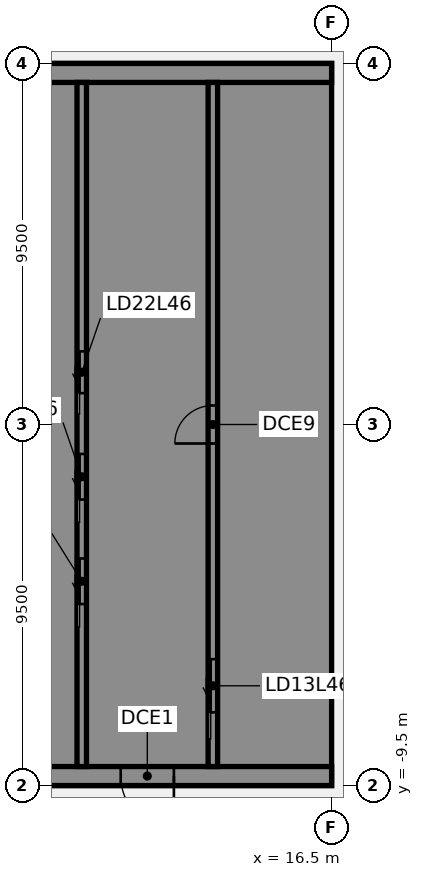
"""IFC4 building model, lengths in metres.
Left out: names, types, materials, properties, quantities, classifications, styles, units other than length and angle.
Written with IfcOpenShell. Run it as: python <this file> out.ifc"""

import sys

from ifc_helpers import new_model, si_unit, direction, frame, frame_2d, origin, place, context, subcontext, project, spatial, polyline, rectangle, outline, extrude, element, fill, save


model = new_model("IFC4")
c1 = context("Model", 3, precision=1e-05, world=origin(), true_north=direction((0.0, 1.0)))
c2 = subcontext(c1, "Body", "Model", "MODEL_VIEW")
j1 = project(units=[si_unit("LENGTHUNIT", "METRE"), si_unit("PLANEANGLEUNIT", "RADIAN")], contexts=[c1])
p1 = place(None, origin())
s1 = spatial("IfcSite", under=j1, at=p1, CompositionType="ELEMENT")
p2 = place(p1, origin())
s2 = spatial("IfcBuilding", under=s1, at=p2, CompositionType="ELEMENT")
p3 = place(p2, frame((0.0, 0.0, 186.1)))
s3 = spatial("IfcBuildingStorey", under=s2, at=p3, CompositionType="ELEMENT", Elevation=186.1)
p4 = place(p3, frame((16.5, -9.25, 0.0), z_axis=(0.0, 0.0, 1.0), x_axis=(-1.0, 0.0, 0.0)))
e1 = element("IfcWall", 1, at=p4, inside=s3, PredefinedType="SHEAR", context=c2, shape_type="SweptSolid", body=[
    extrude(rectangle(XDim=13.0, YDim=0.5, at=frame_2d((6.5, 0.0))), origin(), (0.0, 0.0, 1.0), 3.46),
])
p5 = place(p4, frame((4.15, 0.0, 0.0)))
e2 = element("IfcOpeningElement", 2, at=p5, cuts=e1, PredefinedType="OPENING", context=c2, shape_type="SweptSolid", body=[
    extrude(rectangle(XDim=1.4, YDim=2.1, at=frame_2d((0.7, 1.05))), frame((0.0, 0.26, 0.0), z_axis=(0.0, -1.0, 0.0), x_axis=(1.0, 0.0, 0.0)), (0.0, 0.0, 1.0), 0.52),
])
p6 = place(p4, frame((10.125, 0.0, 0.0)))
e3 = element("IfcOpeningElement", 3, at=p6, cuts=e1, PredefinedType="OPENING", context=c2, shape_type="SweptSolid", body=[
    extrude(rectangle(XDim=1.4, YDim=2.1, at=frame_2d((0.7, 1.05))), frame((0.0, 0.26, 0.0), z_axis=(0.0, -1.0, 0.0), x_axis=(1.0, 0.0, 0.0)), (0.0, 0.0, 1.0), 0.52),
])
p7 = place(p3, origin())
e4 = element("IfcWall", 4, at=p7, inside=s3, PredefinedType="SHEAR", context=c2, shape_type="SweptSolid", body=[
    extrude(outline(polyline([(13.5, -8.125), (13.5, -9.0), (16.0, -9.0), (16.5, -9.0), (16.5, 9.0), (16.0, 9.0), (13.5, 9.0), (13.5, 8.125), (16.0, 8.125), (16.0, 5.625), (13.5, 5.625), (13.5, 5.375), (16.0, 5.375), (16.0, -5.375), (13.5, -5.375), (13.5, -5.625), (16.0, -5.625), (16.0, -8.125), (13.5, -8.125)])), origin(), (0.0, 0.0, 1.0), 3.46),
])
p8 = place(p3, frame((16.5, 9.25, 0.0), z_axis=(0.0, 0.0, 1.0), x_axis=(-1.0, 0.0, 0.0)))
e5 = element("IfcWall", 5, at=p8, inside=s3, PredefinedType="SHEAR", context=c2, shape_type="SweptSolid", body=[
    extrude(rectangle(XDim=13.0, YDim=0.5, at=frame_2d((6.5, 0.0))), origin(), (0.0, 0.0, 1.0), 3.46),
])
p9 = place(p3, origin())
e6 = element("IfcWall", 6, at=p9, inside=s3, PredefinedType="SHEAR", context=c2, shape_type="SweptSolid", body=[
    extrude(outline(polyline([(9.8, -5.375), (7.5, -5.375), (7.5, -2.875), (9.8, -2.875), (9.8, -2.625), (7.5, -2.625), (7.5, -0.125), (9.8, -0.125), (9.8, 0.125), (7.5, 0.125), (7.5, 2.625), (9.8, 2.625), (9.8, 2.875), (7.5, 2.875), (7.5, 5.375), (9.8, 5.375), (9.8, 5.625), (7.5, 5.625), (7.5, 8.125), (9.8, 8.125), (9.8, 9.0), (7.5, 9.0), (7.25, 9.0), (7.25, -5.625), (7.5, -5.625), (9.8, -5.625), (9.8, -5.375)])), origin(), (0.0, 0.0, 1.0), 3.46),
])
p10 = place(p3, origin())
e7 = element("IfcWall", 7, at=p10, inside=s3, PredefinedType="SHEAR", context=c2, shape_type="SweptSolid", body=[
    extrude(outline(polyline([(7.5, -8.125), (7.5, -9.0), (9.8, -9.0), (9.8, -8.125), (9.8, -5.625), (9.55, -5.625), (9.55, -8.125), (7.5, -8.125)])), origin(), (0.0, 0.0, 1.0), 3.46),
])
p11 = place(p3, frame((13.375, -9.0, 0.0), z_axis=(0.0, 0.0, 1.0), x_axis=(0.0, 1.0, 0.0)))
e8 = element("IfcWall", 8, at=p11, inside=s3, PredefinedType="SHEAR", context=c2, shape_type="SweptSolid", body=[
    extrude(rectangle(XDim=18.0, YDim=0.25, at=frame_2d((9.0, 0.0))), origin(), (0.0, 0.0, 1.0), 3.46),
])
p12 = place(p11, frame((1.425, 0.0, 0.0)))
e9 = element("IfcOpeningElement", 9, at=p12, cuts=e8, PredefinedType="OPENING", context=c2, shape_type="SweptSolid", body=[
    extrude(rectangle(XDim=1.4, YDim=2.1, at=frame_2d((0.7, 1.05))), frame((0.0, 0.135, 0.0), z_axis=(0.0, -1.0, 0.0), x_axis=(1.0, 0.0, 0.0)), (0.0, 0.0, 1.0), 0.27),
])
p13 = place(p11, frame((8.5, 0.0, 0.0)))
e10 = element("IfcOpeningElement", 10, at=p13, cuts=e8, PredefinedType="OPENING", context=c2, shape_type="SweptSolid", body=[
    extrude(rectangle(XDim=1.0, YDim=2.1, at=frame_2d((0.5, 1.05))), frame((0.0, 0.135, 0.0), z_axis=(0.0, -1.0, 0.0), x_axis=(1.0, 0.0, 0.0)), (0.0, 0.0, 1.0), 0.27),
])
p14 = place(p3, frame((9.925, -9.0, 0.0), z_axis=(0.0, 0.0, 1.0), x_axis=(0.0, 1.0, 0.0)))
e11 = element("IfcWall", 11, at=p14, inside=s3, PredefinedType="SHEAR", context=c2, shape_type="SweptSolid", body=[
    extrude(rectangle(XDim=18.0, YDim=0.25, at=frame_2d((9.0, 0.0))), origin(), (0.0, 0.0, 1.0), 3.46),
])
p15 = place(p14, frame((4.275, 0.0, 0.0)))
e12 = element("IfcOpeningElement", 12, at=p15, cuts=e11, PredefinedType="OPENING", context=c2, shape_type="SweptSolid", body=[
    extrude(rectangle(XDim=1.2, YDim=2.1, at=frame_2d((0.6, 1.05))), frame((0.0, 0.135, 0.0), z_axis=(0.0, -1.0, 0.0), x_axis=(1.0, 0.0, 0.0)), (0.0, 0.0, 1.0), 0.27),
])
p16 = place(p14, frame((7.025, 0.0, 0.0)))
e13 = element("IfcOpeningElement", 13, at=p16, cuts=e11, PredefinedType="OPENING", context=c2, shape_type="SweptSolid", body=[
    extrude(rectangle(XDim=1.2, YDim=2.1, at=frame_2d((0.6, 1.05))), frame((0.0, 0.135, 0.0), z_axis=(0.0, -1.0, 0.0), x_axis=(1.0, 0.0, 0.0)), (0.0, 0.0, 1.0), 0.27),
])
p17 = place(p14, frame((9.825, 0.0, 0.0)))
e14 = element("IfcOpeningElement", 14, at=p17, cuts=e11, PredefinedType="OPENING", context=c2, shape_type="SweptSolid", body=[
    extrude(rectangle(XDim=1.1, YDim=2.1, at=frame_2d((0.55, 1.05))), frame((0.0, 0.135, 0.0), z_axis=(0.0, -1.0, 0.0), x_axis=(1.0, 0.0, 0.0)), (0.0, 0.0, 1.0), 0.27),
])
p18 = place(p5, origin())
e15 = element("IfcDoor", 15, at=p18, inside=s3, OperationType="SINGLE_SWING_LEFT", PredefinedType="DOOR", context=c2, shape_type="SweptSolid", body=[
    extrude(rectangle(XDim=1.4, YDim=2.1, at=frame_2d((0.7, 1.05))), frame((0.0, 0.025, 0.0), z_axis=(0.0, -1.0, 0.0), x_axis=(1.0, 0.0, 0.0)), (0.0, 0.0, 1.0), 0.05),
])
fill(e2, e15)
p19 = place(p12, origin())
e16 = element("IfcDoor", 16, at=p19, inside=s3, OperationType="SLIDING_TO_LEFT", PredefinedType="DOOR", context=c2, shape_type="SweptSolid", body=[
    extrude(rectangle(XDim=1.4, YDim=2.1, at=frame_2d((0.7, 1.05))), frame((0.0, 0.025, 0.0), z_axis=(0.0, -1.0, 0.0), x_axis=(1.0, 0.0, 0.0)), (0.0, 0.0, 1.0), 0.05),
])
fill(e9, e16)
p20 = place(p15, origin())
e17 = element("IfcDoor", 17, at=p20, inside=s3, OperationType="SLIDING_TO_LEFT", PredefinedType="DOOR", context=c2, shape_type="SweptSolid", body=[
    extrude(rectangle(XDim=1.2, YDim=2.1, at=frame_2d((0.6, 1.05))), frame((0.0, 0.025, 0.0), z_axis=(0.0, -1.0, 0.0), x_axis=(1.0, 0.0, 0.0)), (0.0, 0.0, 1.0), 0.05),
])
fill(e12, e17)
p21 = place(p16, origin())
e18 = element("IfcDoor", 18, at=p21, inside=s3, OperationType="SLIDING_TO_LEFT", PredefinedType="DOOR", context=c2, shape_type="SweptSolid", body=[
    extrude(rectangle(XDim=1.2, YDim=2.1, at=frame_2d((0.6, 1.05))), frame((0.0, 0.025, 0.0), z_axis=(0.0, -1.0, 0.0), x_axis=(1.0, 0.0, 0.0)), (0.0, 0.0, 1.0), 0.05),
])
fill(e13, e18)
p22 = place(p17, origin())
e19 = element("IfcDoor", 19, at=p22, inside=s3, OperationType="SLIDING_TO_LEFT", PredefinedType="DOOR", context=c2, shape_type="SweptSolid", body=[
    extrude(rectangle(XDim=1.1, YDim=2.1, at=frame_2d((0.55, 1.05))), frame((0.0, 0.025, 0.0), z_axis=(0.0, -1.0, 0.0), x_axis=(1.0, 0.0, 0.0)), (0.0, 0.0, 1.0), 0.05),
])
fill(e14, e19)
p23 = place(p13, origin())
e20 = element("IfcDoor", 20, at=p23, inside=s3, OperationType="SINGLE_SWING_LEFT", PredefinedType="DOOR", context=c2, shape_type="SweptSolid", body=[
    extrude(rectangle(XDim=1.0, YDim=2.1, at=frame_2d((0.5, 1.05))), frame((0.0, 0.025, 0.0), z_axis=(0.0, -1.0, 0.0), x_axis=(1.0, 0.0, 0.0)), (0.0, 0.0, 1.0), 0.05),
])
fill(e10, e20)
save(model, sys.argv[1])
